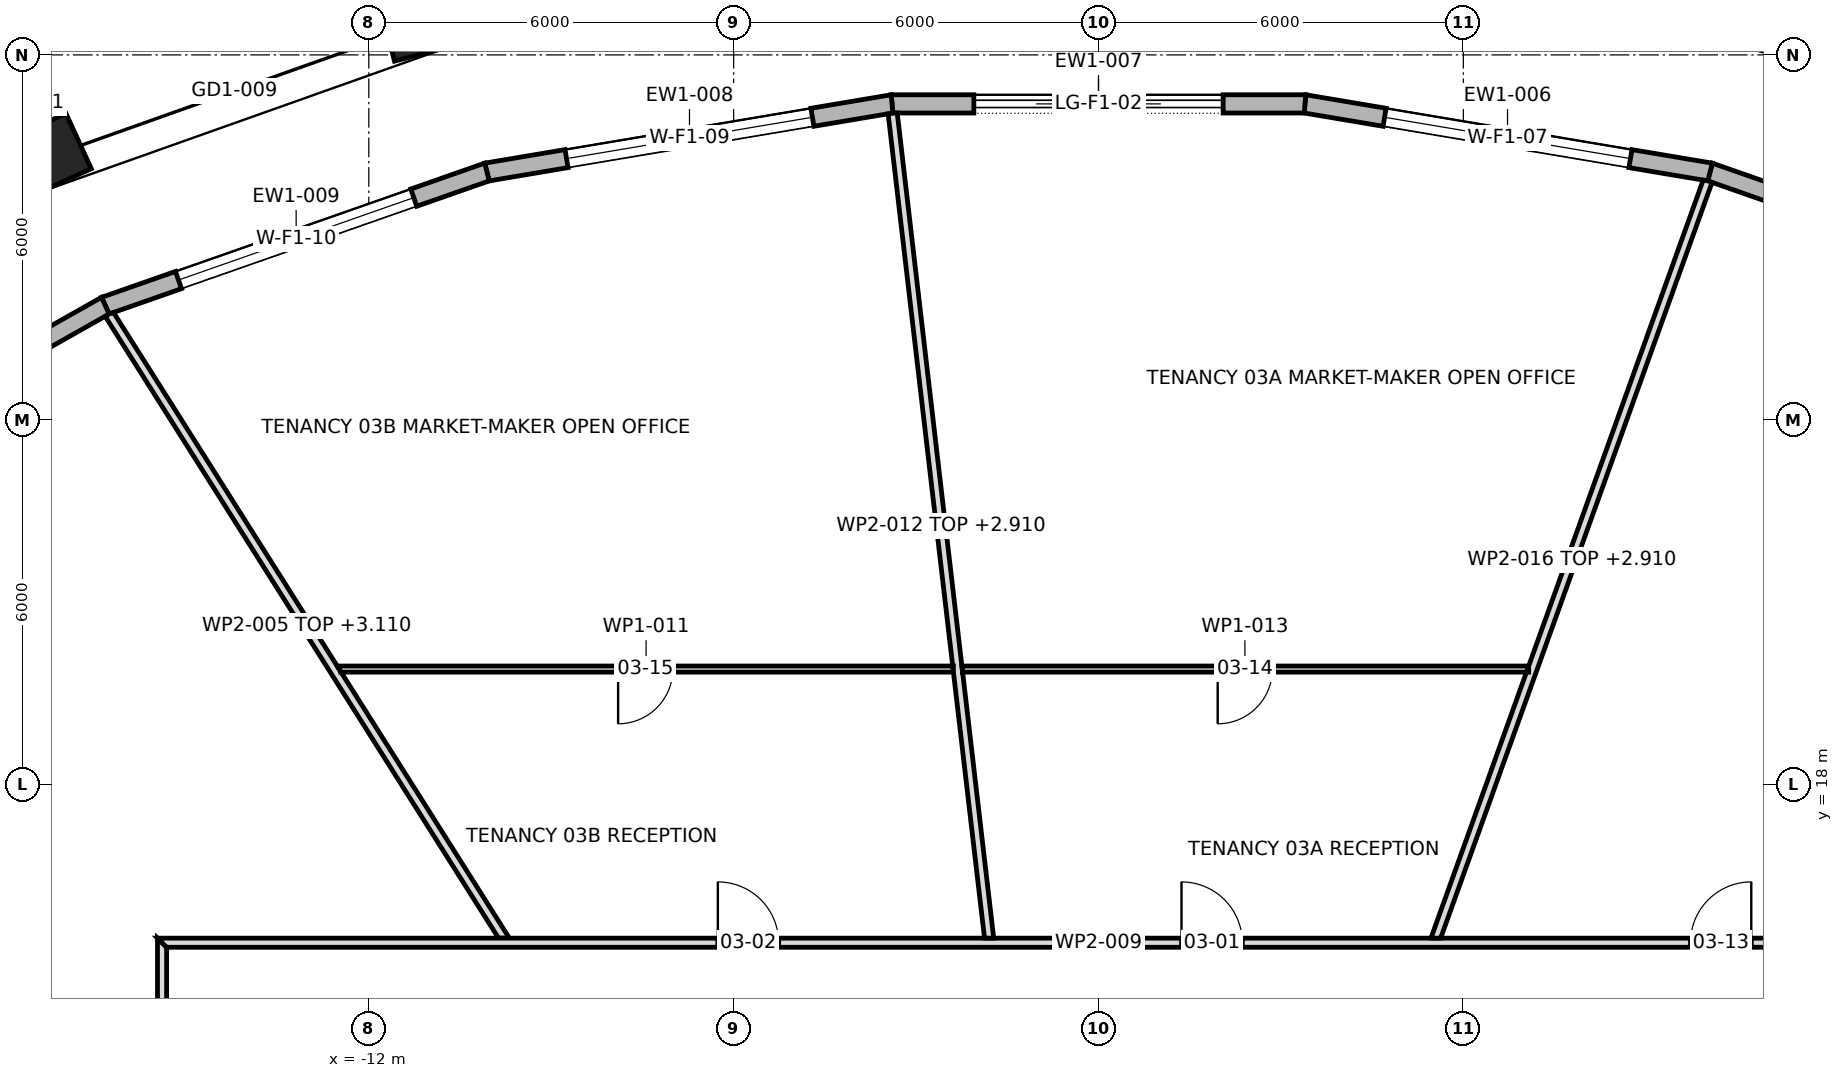
"""IFC4 building model, lengths in metres.
Left out: names, types, materials, properties, quantities, classifications, styles, units other than length and angle.
Written with IfcOpenShell. Run it as: python <this file> out.ifc"""

import sys

from ifc_helpers import new_model, si_unit, direction, frame, frame_2d, origin, origin_2d, place, context, subcontext, project, spatial, polyline, rectangle, outline, extrude, element, fill, save


model = new_model("IFC4")
c1 = context("Model", 3, precision=1e-05, world=origin(), true_north=direction((0.0, 1.0)))
c2 = subcontext(c1, "Body", "Model", "MODEL_VIEW")
j1 = project(units=[si_unit("LENGTHUNIT", "METRE"), si_unit("PLANEANGLEUNIT", "RADIAN")], contexts=[c1])
p1 = place(None, origin())
s1 = spatial("IfcSite", under=j1, at=p1, CompositionType="ELEMENT")
p2 = place(p1, origin())
s2 = spatial("IfcBuilding", under=s1, at=p2, CompositionType="ELEMENT")
p3 = place(p2, frame((0.0, 0.0, 48.7)))
s3 = spatial("IfcBuildingStorey", under=s2, at=p3, CompositionType="ELEMENT", Elevation=48.7)
for number, where, z_axis, x_axis in (
    (1, (10.832, 30.608, 0.0), (0.0, 0.0, 1.0), (-0.968, 0.252, 0.0)),
    (2, (-10.832, 30.608, 0.0), (0.0, 0.0, 1.0), (-0.968, -0.252, 0.0)),
    (3, (-17.591, 28.208, 0.0), (0.0, 0.0, 1.0), (-0.909, -0.417, 0.0)),
):
    element("IfcColumn", number, at=place(p3, frame(where, z_axis=z_axis, x_axis=x_axis)), inside=s3, PredefinedType="COLUMN", context=c2, shape_type="SweptSolid", body=[
        extrude(rectangle(XDim=1.8, YDim=1.0, at=origin_2d()), origin(), (0.0, 0.0, 1.0), 4.2),
    ])
p4 = place(p3, frame((16.333, 25.876, 0.0), z_axis=(0.0, 0.0, 1.0), x_axis=(-0.943790794479, 0.330543395421, 0.0)))
e4 = element("IfcWall", 4, at=p4, inside=s3, PredefinedType="STANDARD", context=c2, shape_type="SweptSolid", body=[
    extrude(outline(polyline([(-0.013, -0.15), (6.662, -0.15), (6.637, 0.15), (0.013, 0.15), (-0.013, -0.15)])), origin(), (0.0, 0.0, 1.0), 3.9),
])
p5 = place(p4, frame((1.275, 0.0, 0.6)))
e5 = element("IfcOpeningElement", 5, at=p5, cuts=e4, PredefinedType="OPENING", context=c2, shape_type="SweptSolid", body=[
    extrude(rectangle(XDim=4.1, YDim=2.85, at=frame_2d((2.05, 1.425))), frame((0.0, 0.162, 0.0), z_axis=(0.0, -1.0, 0.0), x_axis=(1.0, 0.0, 0.0)), (0.0, 0.0, 1.0), 0.324),
])
p6 = place(p3, frame((10.057, 28.074, 0.0), z_axis=(0.0, 0.0, 1.0), x_axis=(-0.986149614624, 0.165858185139, 0.0)))
e6 = element("IfcWall", 6, at=p6, inside=s3, PredefinedType="STANDARD", context=c2, shape_type="SweptSolid", body=[
    extrude(outline(polyline([(-0.013, -0.15), (6.767, -0.15), (6.742, 0.15), (0.013, 0.15), (-0.013, -0.15)])), origin(), (0.0, 0.0, 1.0), 3.9),
])
p7 = place(p6, frame((1.327, 0.0, 0.6)))
e7 = element("IfcOpeningElement", 7, at=p7, cuts=e6, PredefinedType="OPENING", context=c2, shape_type="SweptSolid", body=[
    extrude(rectangle(XDim=4.1, YDim=2.85, at=frame_2d((2.05, 1.425))), frame((0.0, 0.162, 0.0), z_axis=(0.0, -1.0, 0.0), x_axis=(1.0, 0.0, 0.0)), (0.0, 0.0, 1.0), 0.324),
])
p8 = place(p3, frame((3.396, 29.195, 0.0), z_axis=(0.0, 0.0, 1.0), x_axis=(-1.0, 0.0, 0.0)))
e8 = element("IfcWall", 8, at=p8, inside=s3, PredefinedType="STANDARD", context=c2, shape_type="SweptSolid", body=[
    extrude(outline(polyline([(-0.012, -0.15), (6.803, -0.15), (6.779, 0.15), (0.012, 0.15), (-0.012, -0.15)])), origin(), (0.0, 0.0, 1.0), 3.9),
])
p9 = place(p8, frame((1.346, 0.0, 0.0)))
e9 = element("IfcOpeningElement", 9, at=p9, cuts=e8, PredefinedType="OPENING", context=c2, shape_type="SweptSolid", body=[
    extrude(rectangle(XDim=4.1, YDim=3.45, at=frame_2d((2.05, 1.725))), frame((0.0, 0.162, 0.0), z_axis=(0.0, -1.0, 0.0), x_axis=(1.0, 0.0, 0.0)), (0.0, 0.0, 1.0), 0.324),
])
p10 = place(p3, frame((-3.396, 29.195, 0.0), z_axis=(0.0, 0.0, 1.0), x_axis=(-0.986149614624, -0.165858185139, 0.0)))
e10 = element("IfcWall", 10, at=p10, inside=s3, PredefinedType="STANDARD", context=c2, shape_type="SweptSolid", body=[
    extrude(outline(polyline([(-0.012, -0.15), (6.768, -0.15), (6.742, 0.15), (0.012, 0.15), (-0.012, -0.15)])), origin(), (0.0, 0.0, 1.0), 3.9),
])
p11 = place(p10, frame((1.327, 0.0, 0.6)))
e11 = element("IfcOpeningElement", 11, at=p11, cuts=e10, PredefinedType="OPENING", context=c2, shape_type="SweptSolid", body=[
    extrude(rectangle(XDim=4.1, YDim=2.85, at=frame_2d((2.05, 1.425))), frame((0.0, 0.162, 0.0), z_axis=(0.0, -1.0, 0.0), x_axis=(1.0, 0.0, 0.0)), (0.0, 0.0, 1.0), 0.324),
])
p12 = place(p3, frame((-10.057, 28.074, 0.0), z_axis=(0.0, 0.0, 1.0), x_axis=(-0.943790794479, -0.330543395421, 0.0)))
e12 = element("IfcWall", 12, at=p12, inside=s3, PredefinedType="STANDARD", context=c2, shape_type="SweptSolid", body=[
    extrude(outline(polyline([(-0.013, -0.15), (6.663, -0.15), (6.636, 0.15), (0.013, 0.15), (-0.013, -0.15)])), origin(), (0.0, 0.0, 1.0), 3.9),
])
p13 = place(p12, frame((1.275, 0.0, 0.6)))
e13 = element("IfcOpeningElement", 13, at=p13, cuts=e12, PredefinedType="OPENING", context=c2, shape_type="SweptSolid", body=[
    extrude(rectangle(XDim=4.1, YDim=2.85, at=frame_2d((2.05, 1.425))), frame((0.0, 0.162, 0.0), z_axis=(0.0, -1.0, 0.0), x_axis=(1.0, 0.0, 0.0)), (0.0, 0.0, 1.0), 0.324),
])
p14 = place(p3, frame((-16.333, 25.876, 0.0), z_axis=(0.0, 0.0, 1.0), x_axis=(-0.870647609977, -0.491907246584, 0.0)))
e14 = element("IfcWall", 14, at=p14, inside=s3, PredefinedType="STANDARD", context=c2, shape_type="SweptSolid", body=[
    extrude(outline(polyline([(-0.013, -0.15), (6.503, -0.15), (6.475, 0.15), (0.013, 0.15), (-0.013, -0.15)])), origin(), (0.0, 0.0, 1.0), 3.9),
])
p15 = place(p14, frame((1.195, 0.0, 0.6)))
e15 = element("IfcOpeningElement", 15, at=p15, cuts=e14, PredefinedType="OPENING", context=c2, shape_type="SweptSolid", body=[
    extrude(rectangle(XDim=4.1, YDim=2.85, at=frame_2d((2.05, 1.425))), frame((0.0, 0.162, 0.0), z_axis=(0.0, -1.0, 0.0), x_axis=(1.0, 0.0, 0.0)), (0.0, 0.0, 1.0), 0.324),
])
p16 = place(p3, frame((-16.273, 25.742, 0.0), z_axis=(0.0, 0.0, 1.0), x_axis=(0.534654841392, -0.845070529942, 0.0)))
e16 = element("IfcWall", 16, at=p16, inside=s3, PredefinedType="PARTITIONING", context=c2, shape_type="SweptSolid", body=[
    extrude(outline(polyline([(0.0, -0.075), (1.729, -0.075), (3.458, -0.075), (5.186, -0.075), (6.915, -0.075), (8.644, -0.075), (10.373, -0.075), (12.102, -0.075), (12.196, 0.075), (12.196, 0.075), (10.471, 0.075), (8.745, 0.075), (7.019, 0.075), (7.018, 0.072), (7.013, 0.075), (5.265, 0.075), (3.517, 0.075), (1.769, 0.075), (0.021, 0.075), (0.004, 0.0), (0.0, -0.071), (0.0, -0.075)])), origin(), (0.0, 0.0, 1.0), 3.11),
])
p17 = place(p3, frame((-15.4, -15.475, 0.0), z_axis=(0.0, 0.0, 1.0), x_axis=(0.0, 1.0, 0.0)))
e17 = element("IfcWall", 17, at=p17, inside=s3, PredefinedType="PARTITIONING", context=c2, shape_type="SweptSolid", body=[
    extrude(outline(polyline([(0.15, -0.075), (2.066, -0.075), (3.981, -0.075), (5.897, -0.075), (7.812, -0.075), (9.728, -0.075), (11.644, -0.075), (13.56, -0.075), (15.475, -0.075), (17.391, -0.075), (19.306, -0.075), (21.222, -0.075), (23.138, -0.075), (25.053, -0.075), (26.969, -0.075), (28.885, -0.075), (30.8, -0.075), (30.95, 0.075), (29.016, 0.075), (27.081, 0.075), (25.147, 0.075), (23.212, 0.075), (21.278, 0.075), (19.344, 0.075), (17.409, 0.075), (15.475, 0.075), (13.541, 0.075), (11.606, 0.075), (9.672, 0.075), (7.738, 0.075), (5.803, 0.075), (3.869, 0.075), (1.935, 0.075), (0.0, 0.075), (0.15, -0.075)])), origin(), (0.0, 0.0, 1.0), 3.9),
])
p18 = place(p17, frame((25.755, 0.0, 0.0)))
e18 = element("IfcOpeningElement", 18, at=p18, cuts=e17, PredefinedType="OPENING", context=c2, shape_type="SweptSolid", body=[
    extrude(rectangle(XDim=1.8, YDim=2.1, at=frame_2d((0.9, 1.05))), frame((0.0, 0.087, 0.0), z_axis=(0.0, -1.0, 0.0), x_axis=(1.0, 0.0, 0.0)), (0.0, 0.0, 1.0), 0.174),
])
p19 = place(p17, frame((18.695, 0.0, 0.0)))
e19 = element("IfcOpeningElement", 19, at=p19, cuts=e17, PredefinedType="OPENING", context=c2, shape_type="SweptSolid", body=[
    extrude(rectangle(XDim=1.8, YDim=2.1, at=frame_2d((0.9, 1.05))), frame((0.0, 0.087, 0.0), z_axis=(0.0, -1.0, 0.0), x_axis=(1.0, 0.0, 0.0)), (0.0, 0.0, 1.0), 0.174),
])
p20 = place(p17, frame((12.135, 0.0, 0.0)))
e20 = element("IfcOpeningElement", 20, at=p20, cuts=e17, PredefinedType="OPENING", context=c2, shape_type="SweptSolid", body=[
    extrude(rectangle(XDim=1.0, YDim=2.1, at=frame_2d((0.5, 1.05))), frame((0.0, 0.087, 0.0), z_axis=(0.0, -1.0, 0.0), x_axis=(1.0, 0.0, 0.0)), (0.0, 0.0, 1.0), 0.174),
])
p21 = place(p17, frame((3.395, 0.0, 0.0)))
e21 = element("IfcOpeningElement", 21, at=p21, cuts=e17, PredefinedType="OPENING", context=c2, shape_type="SweptSolid", body=[
    extrude(rectangle(XDim=1.8, YDim=2.1, at=frame_2d((0.9, 1.05))), frame((0.0, 0.087, 0.0), z_axis=(0.0, -1.0, 0.0), x_axis=(1.0, 0.0, 0.0)), (0.0, 0.0, 1.0), 0.174),
])
p22 = place(p3, frame((-15.475, 15.4, 0.0), z_axis=(0.0, 0.0, 1.0), x_axis=(1.0, 0.0, 0.0)))
e22 = element("IfcWall", 22, at=p22, inside=s3, PredefinedType="PARTITIONING", context=c2, shape_type="SweptSolid", body=[
    extrude(outline(polyline([(0.15, -0.075), (2.066, -0.075), (3.981, -0.075), (5.897, -0.075), (7.812, -0.075), (9.728, -0.075), (11.644, -0.075), (13.56, -0.075), (15.475, -0.075), (17.391, -0.075), (19.306, -0.075), (21.222, -0.075), (23.138, -0.075), (25.053, -0.075), (26.969, -0.075), (28.885, -0.075), (30.8, -0.075), (30.95, 0.075), (29.016, 0.075), (27.081, 0.075), (25.147, 0.075), (23.212, 0.075), (21.278, 0.075), (19.344, 0.075), (17.409, 0.075), (15.475, 0.075), (13.541, 0.075), (11.606, 0.075), (9.672, 0.075), (7.738, 0.075), (5.803, 0.075), (3.869, 0.075), (1.935, 0.075), (0.0, 0.075), (0.15, -0.075)])), origin(), (0.0, 0.0, 1.0), 3.9),
])
p23 = place(p22, frame((16.84, 0.0, 0.0)))
e23 = element("IfcOpeningElement", 23, at=p23, cuts=e22, PredefinedType="OPENING", context=c2, shape_type="SweptSolid", body=[
    extrude(rectangle(XDim=1.0, YDim=2.1, at=frame_2d((0.5, 1.05))), frame((0.0, 0.087, 0.0), z_axis=(0.0, -1.0, 0.0), x_axis=(1.0, 0.0, 0.0)), (0.0, 0.0, 1.0), 0.174),
])
p24 = place(p22, frame((9.215, 0.0, 0.0)))
e24 = element("IfcOpeningElement", 24, at=p24, cuts=e22, PredefinedType="OPENING", context=c2, shape_type="SweptSolid", body=[
    extrude(rectangle(XDim=1.0, YDim=2.1, at=frame_2d((0.5, 1.05))), frame((0.0, 0.087, 0.0), z_axis=(0.0, -1.0, 0.0), x_axis=(1.0, 0.0, 0.0)), (0.0, 0.0, 1.0), 0.174),
])
p25 = place(p22, frame((25.21, 0.0, 0.0)))
e25 = element("IfcOpeningElement", 25, at=p25, cuts=e22, PredefinedType="OPENING", context=c2, shape_type="SweptSolid", body=[
    extrude(rectangle(XDim=1.0, YDim=2.1, at=frame_2d((0.5, 1.05))), frame((0.0, 0.087, 0.0), z_axis=(0.0, -1.0, 0.0), x_axis=(1.0, 0.0, 0.0)), (0.0, 0.0, 1.0), 0.174),
])
p26 = place(p3, frame((-12.52, 19.9, 0.0), z_axis=(0.0, 0.0, 1.0), x_axis=(1.0, 0.0, 0.0)))
e26 = element("IfcWall", 26, at=p26, inside=s3, PredefinedType="PARTITIONING", context=c2, shape_type="SweptSolid", body=[
    extrude(outline(polyline([(10.134, -0.05), (10.134, -0.049), (10.122, 0.05), (8.435, 0.05), (6.748, 0.05), (5.061, 0.05), (3.374, 0.05), (1.687, 0.05), (0.0, 0.05), (0.0, 0.05), (0.063, -0.05), (1.741, -0.05), (3.42, -0.05), (5.098, -0.05), (6.777, -0.05), (8.455, -0.05), (10.134, -0.05)])), origin(), (0.0, 0.0, 1.0), 3.9),
])
p27 = place(p26, frame((4.619, 0.0, 0.0)))
e27 = element("IfcOpeningElement", 27, at=p27, cuts=e26, PredefinedType="OPENING", context=c2, shape_type="SweptSolid", body=[
    extrude(rectangle(XDim=0.9, YDim=2.1, at=frame_2d((0.45, 1.05))), frame((0.0, 0.062, 0.0), z_axis=(0.0, -1.0, 0.0), x_axis=(1.0, 0.0, 0.0)), (0.0, 0.0, 1.0), 0.124),
])
p28 = place(p3, frame((-3.385, 29.04, 0.0), z_axis=(0.0, 0.0, 1.0), x_axis=(0.116139488934, -0.993232912821, 0.0)))
e28 = element("IfcWall", 28, at=p28, inside=s3, PredefinedType="PARTITIONING", context=c2, shape_type="SweptSolid", body=[
    extrude(outline(polyline([(0.0, -0.075), (1.829, -0.075), (3.657, -0.075), (5.486, -0.075), (7.314, -0.075), (9.143, -0.075), (9.145, -0.063), (9.243, -0.075), (10.711, -0.075), (12.18, -0.075), (13.649, -0.075), (13.666, 0.073), (13.666, 0.075), (12.198, 0.075), (10.73, 0.075), (9.261, 0.075), (9.261, 0.075), (9.261, 0.075), (7.41, 0.075), (5.558, 0.075), (3.707, 0.075), (1.856, 0.075), (0.004, 0.075), (0.0, 0.038), (0.0, -0.075)])), origin(), (0.0, 0.0, 1.0), 2.91),
])
p29 = place(p3, frame((-2.247, 19.9, 0.0), z_axis=(0.0, 0.0, 1.0), x_axis=(1.0, 0.0, 0.0)))
e29 = element("IfcWall", 29, at=p29, inside=s3, PredefinedType="PARTITIONING", context=c2, shape_type="SweptSolid", body=[
    extrude(outline(polyline([(0.012, -0.05), (1.866, -0.05), (3.721, -0.05), (5.576, -0.05), (7.43, -0.05), (9.285, -0.05), (9.321, 0.049), (9.321, 0.05), (7.457, 0.05), (5.592, 0.05), (3.728, 0.05), (1.864, 0.05), (0.0, 0.05), (0.012, -0.05)])), origin(), (0.0, 0.0, 1.0), 3.9),
])
p30 = place(p29, frame((4.207, 0.0, 0.0)))
e30 = element("IfcOpeningElement", 30, at=p30, cuts=e29, PredefinedType="OPENING", context=c2, shape_type="SweptSolid", body=[
    extrude(rectangle(XDim=0.9, YDim=2.1, at=frame_2d((0.45, 1.05))), frame((0.0, 0.062, 0.0), z_axis=(0.0, -1.0, 0.0), x_axis=(1.0, 0.0, 0.0)), (0.0, 0.0, 1.0), 0.124),
])
p31 = place(p3, frame((5.538, 15.45, 0.0), z_axis=(0.0, 0.0, 1.0), x_axis=(0.337991057854, 0.941149321208, 0.0)))
e31 = element("IfcWall", 31, at=p31, inside=s3, PredefinedType="PARTITIONING", context=c2, shape_type="SweptSolid", body=[
    extrude(outline(polyline([(13.259, -0.075), (13.259, -0.041), (13.259, -0.0), (13.245, 0.075), (11.547, 0.075), (9.849, 0.075), (8.15, 0.075), (6.452, 0.075), (4.754, 0.075), (4.66, 0.042), (4.648, 0.075), (3.099, 0.075), (1.549, 0.075), (0.0, 0.075), (0.0, 0.074), (0.053, -0.075), (1.94, -0.075), (3.826, -0.075), (5.713, -0.075), (7.6, -0.075), (9.486, -0.075), (11.373, -0.075), (13.259, -0.075)])), origin(), (0.0, 0.0, 1.0), 2.91),
])
p32 = place(p7, origin())
e32 = element("IfcWindow", 32, at=p32, inside=s3, PartitioningType="TRIPLE_PANEL_VERTICAL", PredefinedType="WINDOW", context=c2, shape_type="SweptSolid", body=[
    extrude(rectangle(XDim=4.1, YDim=2.85, at=frame_2d((2.05, 1.425))), frame((0.0, 0.03, 0.0), z_axis=(0.0, -1.0, 0.0), x_axis=(1.0, 0.0, 0.0)), (0.0, 0.0, 1.0), 0.06),
])
fill(e7, e32)
p33 = place(p9, origin())
e33 = element("IfcDoor", 33, at=p33, inside=s3, OperationType="DOUBLE_DOOR_SLIDING", PredefinedType="DOOR", context=c2, shape_type="SweptSolid", body=[
    extrude(rectangle(XDim=4.1, YDim=3.45, at=frame_2d((2.05, 1.725))), frame((0.0, 0.025, 0.0), z_axis=(0.0, -1.0, 0.0), x_axis=(1.0, 0.0, 0.0)), (0.0, 0.0, 1.0), 0.05),
])
fill(e9, e33)
p34 = place(p11, origin())
e34 = element("IfcWindow", 34, at=p34, inside=s3, PartitioningType="TRIPLE_PANEL_VERTICAL", PredefinedType="WINDOW", context=c2, shape_type="SweptSolid", body=[
    extrude(rectangle(XDim=4.1, YDim=2.85, at=frame_2d((2.05, 1.425))), frame((0.0, 0.03, 0.0), z_axis=(0.0, -1.0, 0.0), x_axis=(1.0, 0.0, 0.0)), (0.0, 0.0, 1.0), 0.06),
])
fill(e11, e34)
p35 = place(p13, origin())
e35 = element("IfcWindow", 35, at=p35, inside=s3, PartitioningType="TRIPLE_PANEL_VERTICAL", PredefinedType="WINDOW", context=c2, shape_type="SweptSolid", body=[
    extrude(rectangle(XDim=4.1, YDim=2.85, at=frame_2d((2.05, 1.425))), frame((0.0, 0.03, 0.0), z_axis=(0.0, -1.0, 0.0), x_axis=(1.0, 0.0, 0.0)), (0.0, 0.0, 1.0), 0.06),
])
fill(e13, e35)
p36 = place(p23, origin())
e36 = element("IfcDoor", 36, at=p36, inside=s3, OperationType="SINGLE_SWING_RIGHT", PredefinedType="DOOR", context=c2, shape_type="SweptSolid", body=[
    extrude(rectangle(XDim=1.0, YDim=2.1, at=frame_2d((0.5, 1.05))), frame((0.0, 0.025, 0.0), z_axis=(0.0, -1.0, 0.0), x_axis=(1.0, 0.0, 0.0)), (0.0, 0.0, 1.0), 0.05),
])
fill(e23, e36)
p37 = place(p24, origin())
e37 = element("IfcDoor", 37, at=p37, inside=s3, OperationType="SINGLE_SWING_RIGHT", PredefinedType="DOOR", context=c2, shape_type="SweptSolid", body=[
    extrude(rectangle(XDim=1.0, YDim=2.1, at=frame_2d((0.5, 1.05))), frame((0.0, 0.025, 0.0), z_axis=(0.0, -1.0, 0.0), x_axis=(1.0, 0.0, 0.0)), (0.0, 0.0, 1.0), 0.05),
])
fill(e24, e37)
p38 = place(p25, origin())
e38 = element("IfcDoor", 38, at=p38, inside=s3, OperationType="SINGLE_SWING_LEFT", PredefinedType="DOOR", context=c2, shape_type="SweptSolid", body=[
    extrude(rectangle(XDim=1.0, YDim=2.1, at=frame_2d((0.5, 1.05))), frame((0.0, 0.025, 0.0), z_axis=(0.0, -1.0, 0.0), x_axis=(1.0, 0.0, 0.0)), (0.0, 0.0, 1.0), 0.05),
])
fill(e25, e38)
p39 = place(p30, frame((0.9, 0.0, 0.0), z_axis=(0.0, 0.0, 1.0), x_axis=(-1.0, 0.0, 0.0)))
e39 = element("IfcDoor", 39, at=p39, inside=s3, OperationType="SINGLE_SWING_LEFT", PredefinedType="DOOR", context=c2, shape_type="SweptSolid", body=[
    extrude(rectangle(XDim=0.9, YDim=2.1, at=frame_2d((0.45, 1.05))), frame((0.0, 0.025, 0.0), z_axis=(0.0, -1.0, 0.0), x_axis=(1.0, 0.0, 0.0)), (0.0, 0.0, 1.0), 0.05),
])
fill(e30, e39)
p40 = place(p27, frame((0.9, 0.0, 0.0), z_axis=(0.0, 0.0, 1.0), x_axis=(-1.0, 0.0, 0.0)))
e40 = element("IfcDoor", 40, at=p40, inside=s3, OperationType="SINGLE_SWING_LEFT", PredefinedType="DOOR", context=c2, shape_type="SweptSolid", body=[
    extrude(rectangle(XDim=0.9, YDim=2.1, at=frame_2d((0.45, 1.05))), frame((0.0, 0.025, 0.0), z_axis=(0.0, -1.0, 0.0), x_axis=(1.0, 0.0, 0.0)), (0.0, 0.0, 1.0), 0.05),
])
fill(e27, e40)
save(model, sys.argv[1])
